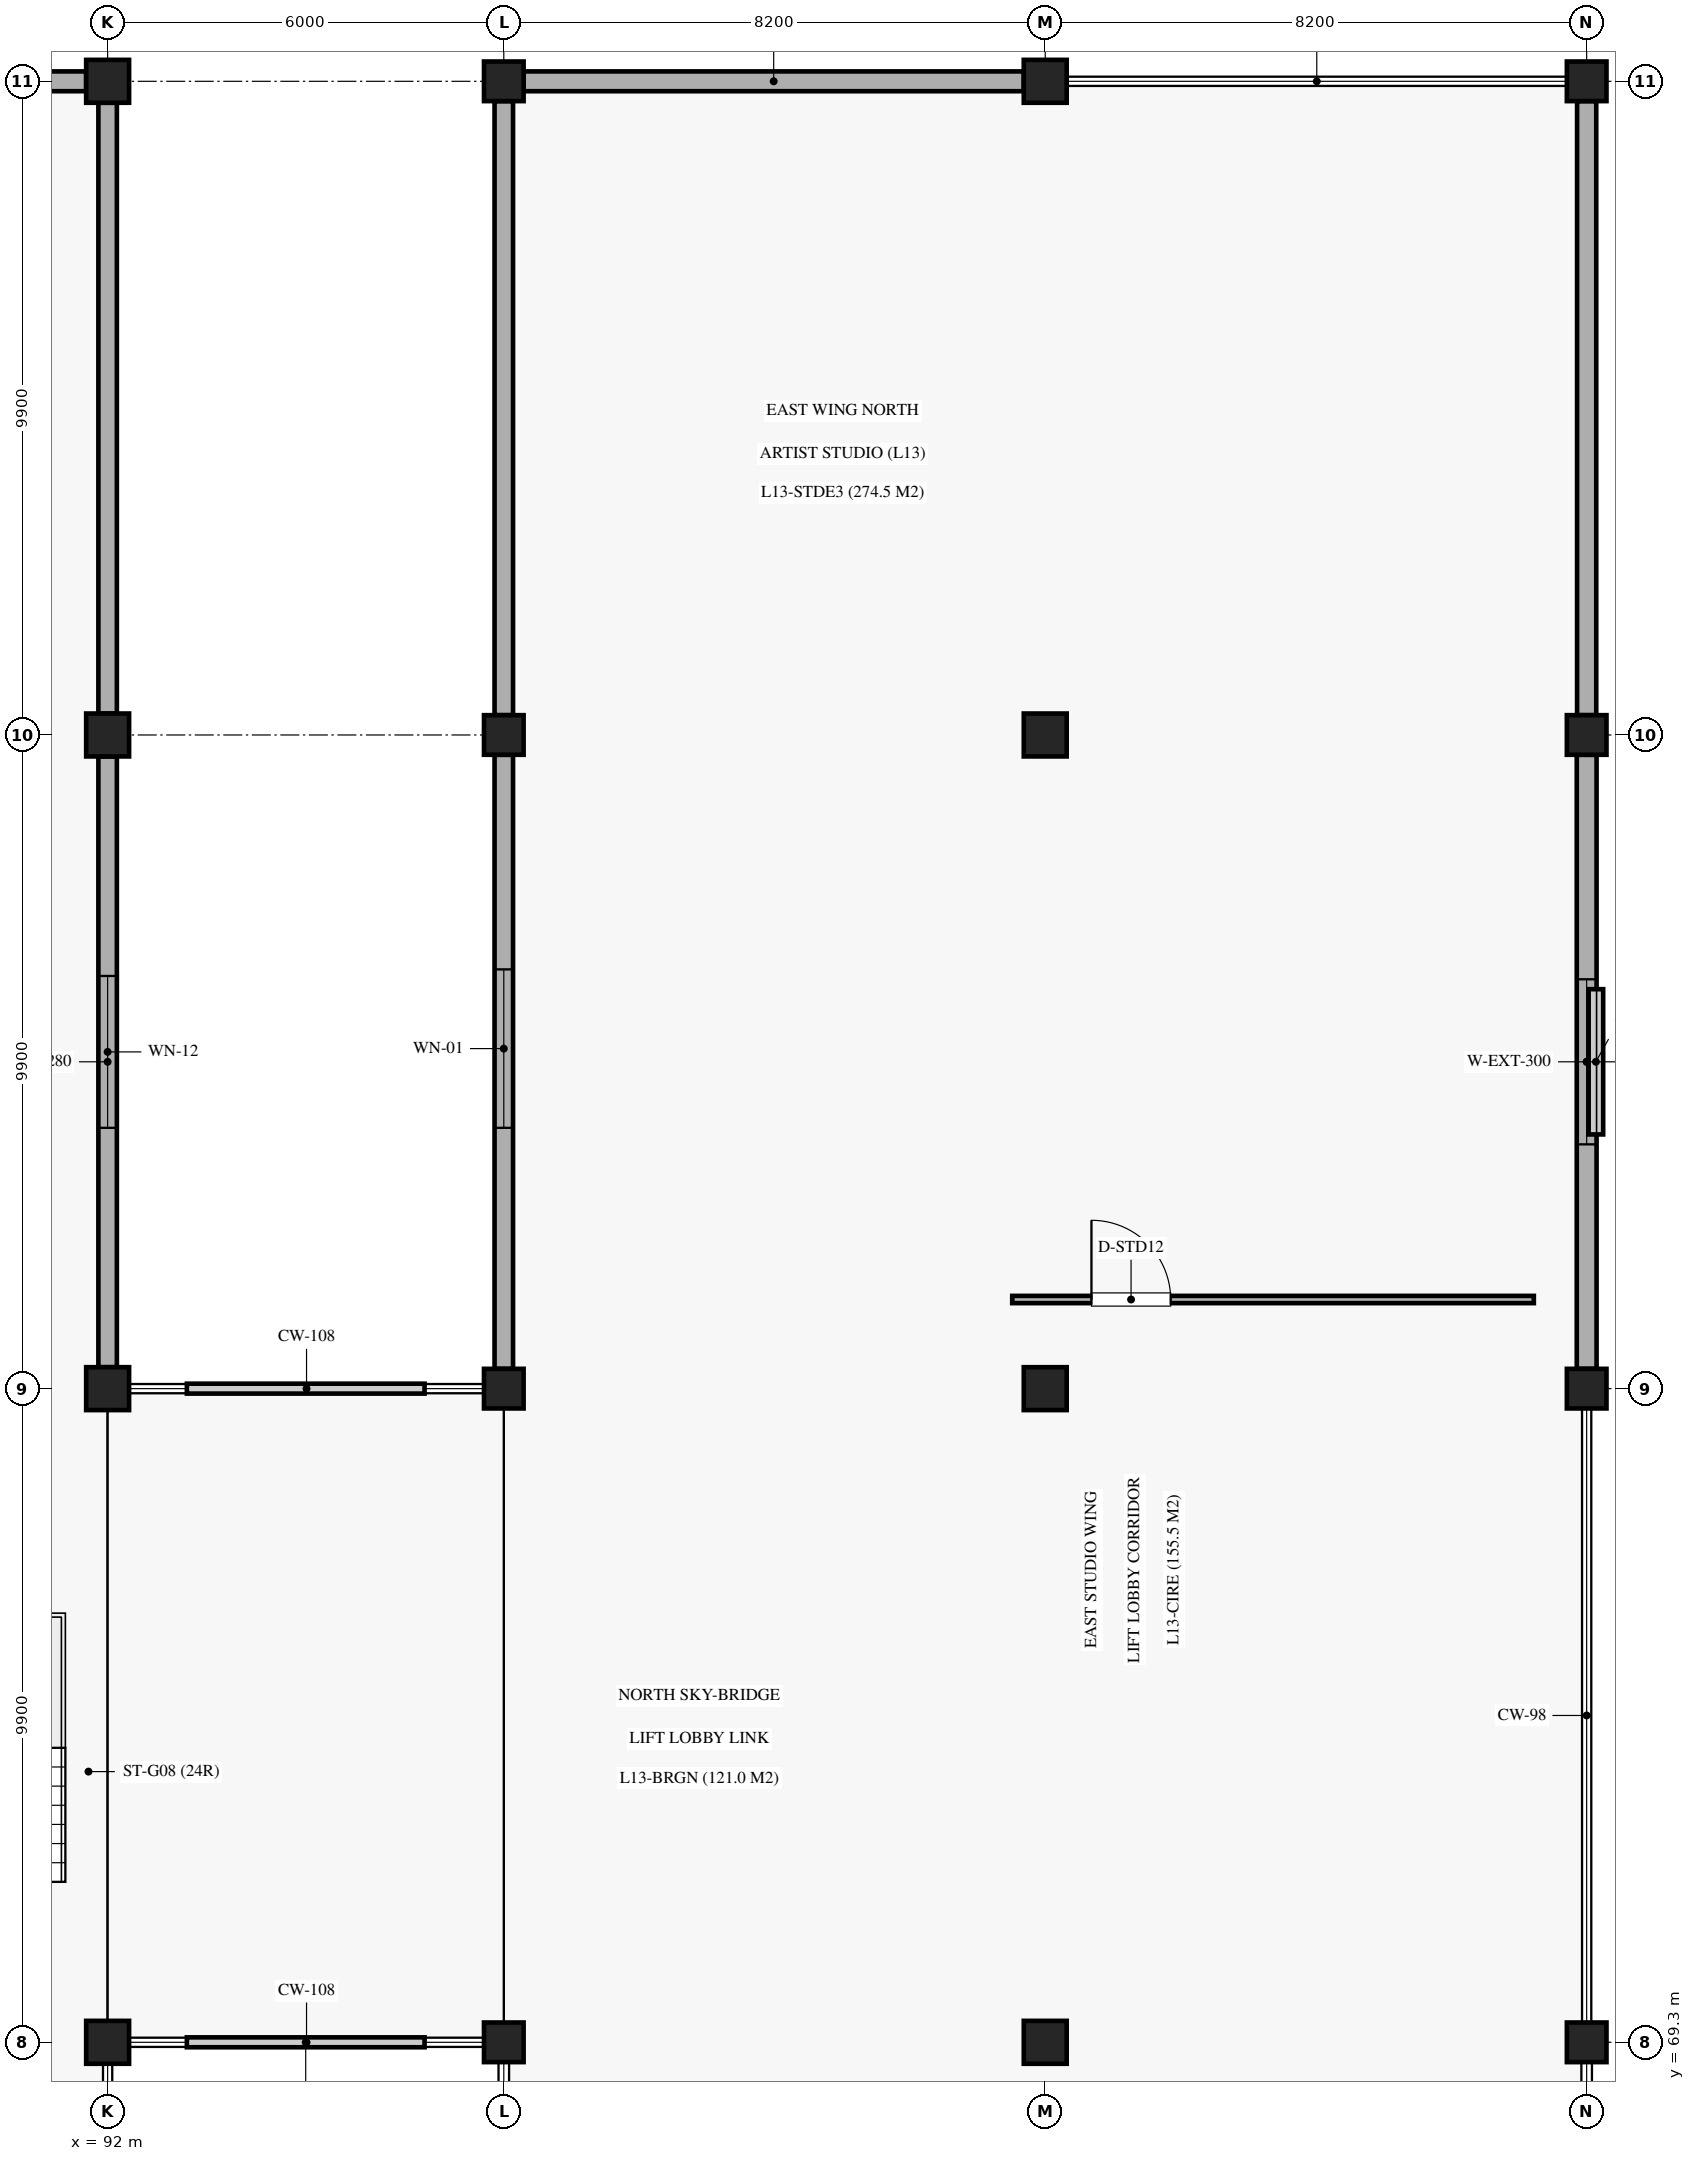
"""IFC4 building model, lengths in metres.
Left out: names, types, materials, properties, quantities, classifications, styles, units other than length and angle.
Written with IfcOpenShell. Run it as: python <this file> out.ifc"""

import sys

from ifc_helpers import new_model, si_unit, direction, frame, frame_2d, origin, origin_2d, place, context, subcontext, project, spatial, rectangle, extrude, element, fill, save


model = new_model("IFC4")
c1 = context("Model", 3, precision=1e-05, world=origin(), true_north=direction((0.0, 1.0)))
c2 = subcontext(c1, "Body", "Model", "MODEL_VIEW")
j1 = project(units=[si_unit("LENGTHUNIT", "METRE"), si_unit("PLANEANGLEUNIT", "RADIAN")], contexts=[c1])
p1 = place(None, origin())
s1 = spatial("IfcSite", under=j1, at=p1, CompositionType="ELEMENT")
p2 = place(p1, origin())
s2 = spatial("IfcBuilding", under=s1, at=p2, CompositionType="ELEMENT")
p3 = place(p2, frame((0.0, 0.0, 66.3)))
s3 = spatial("IfcBuildingStorey", under=s2, at=p3, CompositionType="ELEMENT", Elevation=66.3)
for number, where, z_axis, x_axis in (
    (1, (92.0, 69.3, 0.0), (0.0, 0.0, 1.0), (1.0, 0.0, 0.0)),
    (2, (92.0, 79.2, 0.0), (0.0, 0.0, 1.0), (1.0, 0.0, 0.0)),
    (3, (92.0, 89.1, 0.0), (0.0, 0.0, 1.0), (1.0, 0.0, 0.0)),
    (4, (92.0, 99.0, 0.0), (0.0, 0.0, 1.0), (1.0, 0.0, 0.0)),
):
    element("IfcColumn", number, at=place(p3, frame(where, z_axis=z_axis, x_axis=x_axis)), inside=s3, PredefinedType="COLUMN", context=c2, shape_type="SweptSolid", body=[
        extrude(rectangle(XDim=0.65, YDim=0.65, at=origin_2d()), origin(), (0.0, 0.0, 1.0), 4.08),
    ])
for number, where, z_axis, x_axis in (
    (5, (98.0, 69.3, 0.0), (0.0, 0.0, 1.0), (1.0, 0.0, 0.0)),
    (6, (98.0, 79.2, 0.0), (0.0, 0.0, 1.0), (1.0, 0.0, 0.0)),
    (7, (98.0, 89.1, 0.0), (0.0, 0.0, 1.0), (1.0, 0.0, 0.0)),
    (8, (98.0, 99.0, 0.0), (0.0, 0.0, 1.0), (1.0, 0.0, 0.0)),
):
    element("IfcColumn", number, at=place(p3, frame(where, z_axis=z_axis, x_axis=x_axis)), inside=s3, PredefinedType="COLUMN", context=c2, shape_type="SweptSolid", body=[
        extrude(rectangle(XDim=0.6, YDim=0.6, at=origin_2d()), origin(), (0.0, 0.0, 1.0), 4.08),
    ])
for number, where, z_axis, x_axis in (
    (9, (106.2, 69.3, 0.0), (0.0, 0.0, 1.0), (1.0, 0.0, 0.0)),
    (10, (106.2, 79.2, 0.0), (0.0, 0.0, 1.0), (1.0, 0.0, 0.0)),
    (11, (106.2, 89.1, 0.0), (0.0, 0.0, 1.0), (1.0, 0.0, 0.0)),
    (12, (106.2, 99.0, 0.0), (0.0, 0.0, 1.0), (1.0, 0.0, 0.0)),
):
    element("IfcColumn", number, at=place(p3, frame(where, z_axis=z_axis, x_axis=x_axis)), inside=s3, PredefinedType="COLUMN", context=c2, shape_type="SweptSolid", body=[
        extrude(rectangle(XDim=0.65, YDim=0.65, at=origin_2d()), origin(), (0.0, 0.0, 1.0), 4.08),
    ])
for number, where, z_axis, x_axis in (
    (13, (114.4, 69.3, 0.0), (0.0, 0.0, 1.0), (1.0, 0.0, 0.0)),
    (14, (114.4, 79.2, 0.0), (0.0, 0.0, 1.0), (1.0, 0.0, 0.0)),
    (15, (114.4, 89.1, 0.0), (0.0, 0.0, 1.0), (1.0, 0.0, 0.0)),
    (16, (114.4, 99.0, 0.0), (0.0, 0.0, 1.0), (1.0, 0.0, 0.0)),
):
    element("IfcColumn", number, at=place(p3, frame(where, z_axis=z_axis, x_axis=x_axis)), inside=s3, PredefinedType="COLUMN", context=c2, shape_type="SweptSolid", body=[
        extrude(rectangle(XDim=0.6, YDim=0.6, at=origin_2d()), origin(), (0.0, 0.0, 1.0), 4.08),
    ])
p4 = place(p3, frame((92.0, 79.525, 0.0), z_axis=(0.0, 0.0, 1.0), x_axis=(0.0, 1.0, 0.0)))
e17 = element("IfcWall", 17, at=p4, inside=s3, PredefinedType="SOLIDWALL", context=c2, shape_type="SweptSolid", body=[
    extrude(rectangle(XDim=9.25, YDim=0.28, at=frame_2d((4.625, 0.0))), origin(), (0.0, 0.0, 1.0), 3.08),
])
p5 = place(p4, frame((3.625, 0.0, 1.15)))
e18 = element("IfcOpeningElement", 18, at=p5, cuts=e17, PredefinedType="OPENING", context=c2, shape_type="SweptSolid", body=[
    extrude(rectangle(XDim=2.3, YDim=1.55, at=frame_2d((1.15, 0.775))), frame((0.0, 0.15, 0.0), z_axis=(0.0, -1.0, 0.0), x_axis=(1.0, 0.0, 0.0)), (0.0, 0.0, 1.0), 0.3),
])
p6 = place(p3, frame((92.0, 89.425, 0.0), z_axis=(0.0, 0.0, 1.0), x_axis=(0.0, 1.0, 0.0)))
e19 = element("IfcWall", 19, at=p6, inside=s3, PredefinedType="SOLIDWALL", context=c2, shape_type="SweptSolid", body=[
    extrude(rectangle(XDim=9.25, YDim=0.28, at=frame_2d((4.625, 0.0))), origin(), (0.0, 0.0, 1.0), 3.08),
])
p7 = place(p3, frame((84.325, 99.0, 0.0), z_axis=(0.0, 0.0, 1.0), x_axis=(1.0, 0.0, 0.0)))
e20 = element("IfcWall", 20, at=p7, inside=s3, PredefinedType="SOLIDWALL", context=c2, shape_type="SweptSolid", body=[
    extrude(rectangle(XDim=7.35, YDim=0.3, at=frame_2d((3.675, 0.0))), origin(), (0.0, 0.0, 1.0), 3.08),
])
p8 = place(p3, frame((98.0, 79.5, 0.0), z_axis=(0.0, 0.0, 1.0), x_axis=(0.0, 1.0, 0.0)))
e21 = element("IfcWall", 21, at=p8, inside=s3, PredefinedType="SOLIDWALL", context=c2, shape_type="SweptSolid", body=[
    extrude(rectangle(XDim=9.3, YDim=0.28, at=frame_2d((4.65, 0.0))), origin(), (0.0, 0.0, 1.0), 3.08),
])
p9 = place(p8, frame((3.65, 0.0, 1.15)))
e22 = element("IfcOpeningElement", 22, at=p9, cuts=e21, PredefinedType="OPENING", context=c2, shape_type="SweptSolid", body=[
    extrude(rectangle(XDim=2.4, YDim=1.8, at=frame_2d((1.2, 0.9))), frame((0.0, 0.15, 0.0), z_axis=(0.0, -1.0, 0.0), x_axis=(1.0, 0.0, 0.0)), (0.0, 0.0, 1.0), 0.3),
])
p10 = place(p3, frame((114.4, 79.5, 0.0), z_axis=(0.0, 0.0, 1.0), x_axis=(0.0, 1.0, 0.0)))
e23 = element("IfcWall", 23, at=p10, inside=s3, PredefinedType="SOLIDWALL", context=c2, shape_type="SweptSolid", body=[
    extrude(rectangle(XDim=9.3, YDim=0.3, at=frame_2d((4.65, 0.0))), origin(), (0.0, 0.0, 1.0), 3.08),
])
p11 = place(p10, frame((3.4, 0.0, 1.15)))
e24 = element("IfcOpeningElement", 24, at=p11, cuts=e23, PredefinedType="OPENING", context=c2, shape_type="SweptSolid", body=[
    extrude(rectangle(XDim=2.5, YDim=1.6, at=frame_2d((1.25, 0.8))), frame((0.0, 0.16, 0.0), z_axis=(0.0, -1.0, 0.0), x_axis=(1.0, 0.0, 0.0)), (0.0, 0.0, 1.0), 0.32),
])
p12 = place(p3, frame((98.0, 89.4, 0.0), z_axis=(0.0, 0.0, 1.0), x_axis=(0.0, 1.0, 0.0)))
e25 = element("IfcWall", 25, at=p12, inside=s3, PredefinedType="SOLIDWALL", context=c2, shape_type="SweptSolid", body=[
    extrude(rectangle(XDim=9.3, YDim=0.28, at=frame_2d((4.65, 0.0))), origin(), (0.0, 0.0, 1.0), 3.08),
])
p13 = place(p3, frame((114.4, 89.4, 0.0), z_axis=(0.0, 0.0, 1.0), x_axis=(0.0, 1.0, 0.0)))
e26 = element("IfcWall", 26, at=p13, inside=s3, PredefinedType="SOLIDWALL", context=c2, shape_type="SweptSolid", body=[
    extrude(rectangle(XDim=9.3, YDim=0.29, at=frame_2d((4.65, 0.0))), origin(), (0.0, 0.0, 1.0), 3.08),
])
p14 = place(p3, frame((98.3, 99.0, 0.0), z_axis=(0.0, 0.0, 1.0), x_axis=(1.0, 0.0, 0.0)))
e27 = element("IfcWall", 27, at=p14, inside=s3, PredefinedType="SOLIDWALL", context=c2, shape_type="SweptSolid", body=[
    extrude(rectangle(XDim=7.575, YDim=0.3, at=frame_2d((3.788, 0.0))), origin(), (0.0, 0.0, 1.0), 3.08),
])
p15 = place(p3, frame((105.7, 80.55, 0.0), z_axis=(0.0, 0.0, 1.0), x_axis=(1.0, 0.0, 0.0)))
e28 = element("IfcWall", 28, at=p15, inside=s3, PredefinedType="PARTITIONING", context=c2, shape_type="SweptSolid", body=[
    extrude(rectangle(XDim=7.9, YDim=0.11, at=frame_2d((3.95, 0.0))), origin(), (0.0, 0.0, 1.0), 2.95),
])
p16 = place(p15, frame((1.2, 0.0, 0.0)))
e29 = element("IfcOpeningElement", 29, at=p16, cuts=e28, PredefinedType="OPENING", context=c2, shape_type="SweptSolid", body=[
    extrude(rectangle(XDim=1.2, YDim=2.25, at=frame_2d((0.6, 1.125))), frame((0.0, 0.065, 0.0), z_axis=(0.0, -1.0, 0.0), x_axis=(1.0, 0.0, 0.0)), (0.0, 0.0, 1.0), 0.13),
])
p17 = place(p5, origin())
e30 = element("IfcWindow", 30, at=p17, inside=s3, PartitioningType="SINGLE_PANEL", PredefinedType="WINDOW", context=c2, shape_type="SweptSolid", body=[
    extrude(rectangle(XDim=2.3, YDim=1.55, at=frame_2d((1.15, 0.775))), frame((0.0, 0.03, 0.0), z_axis=(0.0, -1.0, 0.0), x_axis=(1.0, 0.0, 0.0)), (0.0, 0.0, 1.0), 0.06),
])
fill(e18, e30)
p18 = place(p9, origin())
e31 = element("IfcWindow", 31, at=p18, inside=s3, PartitioningType="SINGLE_PANEL", PredefinedType="WINDOW", context=c2, shape_type="SweptSolid", body=[
    extrude(rectangle(XDim=2.4, YDim=1.8, at=frame_2d((1.2, 0.9))), frame((0.0, 0.03, 0.0), z_axis=(0.0, -1.0, 0.0), x_axis=(1.0, 0.0, 0.0)), (0.0, 0.0, 1.0), 0.06),
])
fill(e22, e31)
p19 = place(p11, origin())
e32 = element("IfcWindow", 32, at=p19, inside=s3, PartitioningType="SINGLE_PANEL", PredefinedType="WINDOW", context=c2, shape_type="SweptSolid", body=[
    extrude(rectangle(XDim=2.5, YDim=1.6, at=frame_2d((1.25, 0.8))), frame((0.0, 0.03, 0.0), z_axis=(0.0, -1.0, 0.0), x_axis=(1.0, 0.0, 0.0)), (0.0, 0.0, 1.0), 0.06),
])
fill(e24, e32)
p20 = place(p16, origin())
e33 = element("IfcDoor", 33, at=p20, inside=s3, OperationType="SINGLE_SWING_LEFT", PredefinedType="DOOR", context=c2, shape_type="SweptSolid", body=[
    extrude(rectangle(XDim=1.2, YDim=2.25, at=frame_2d((0.6, 1.125))), frame((0.0, 0.025, 0.0), z_axis=(0.0, -1.0, 0.0), x_axis=(1.0, 0.0, 0.0)), (0.0, 0.0, 1.0), 0.05),
])
fill(e29, e33)
save(model, sys.argv[1])
